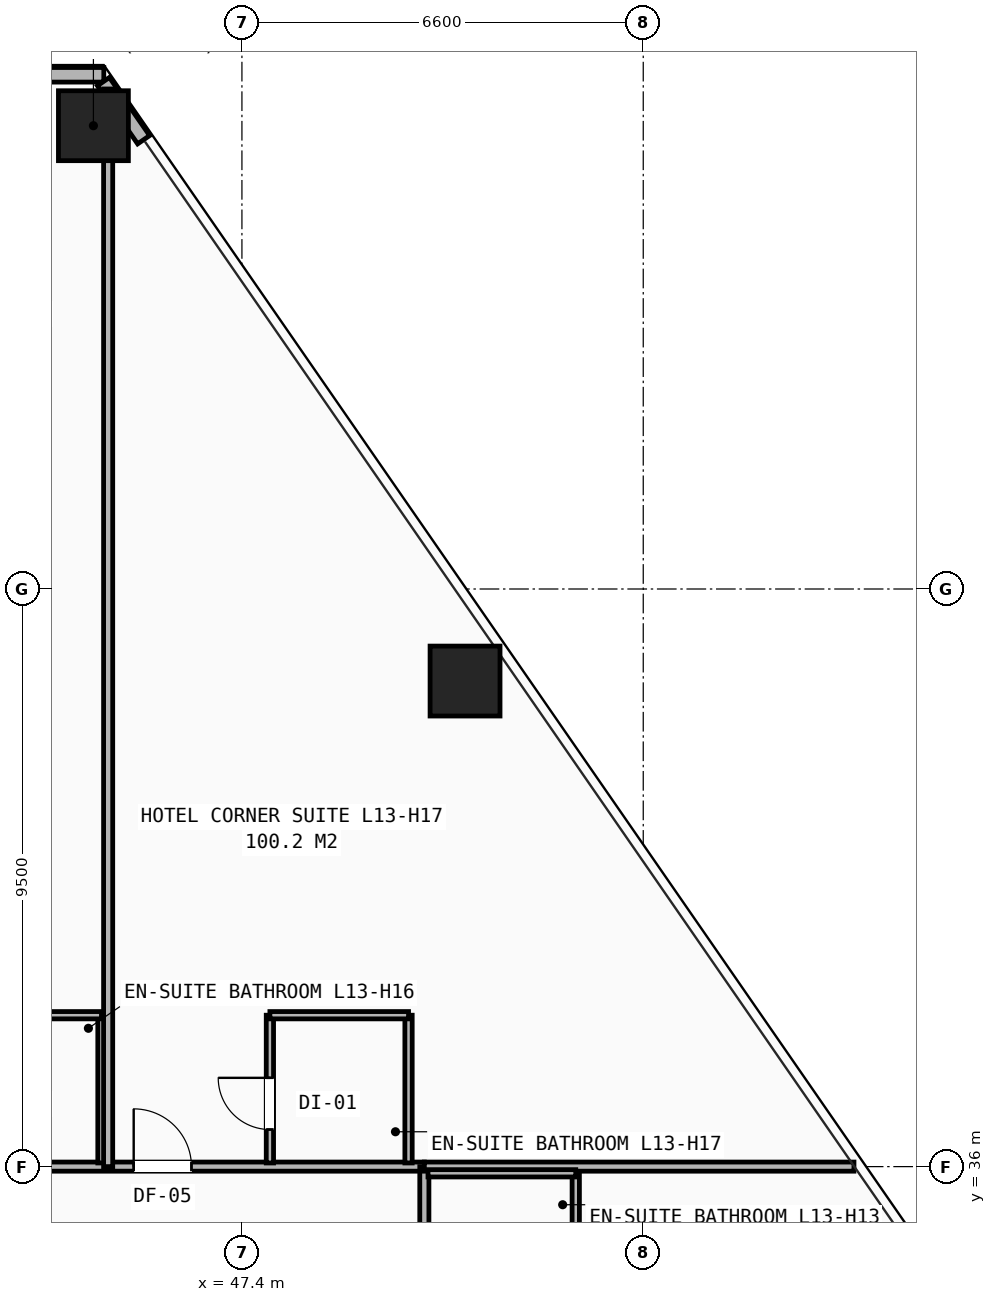
"""IFC4 building model, lengths in metres.
Left out: names, types, materials, properties, quantities, classifications, styles, units other than length and angle.
Written with IfcOpenShell. Run it as: python <this file> out.ifc"""

import sys

from ifc_helpers import new_model, si_unit, direction, frame, frame_2d, origin, origin_2d, place, context, subcontext, project, spatial, rectangle, hollow_rectangle, extrude, element, fill, save


model = new_model("IFC4")
c1 = context("Model", 3, precision=1e-05, world=origin(), true_north=direction((0.0, 1.0)))
c2 = subcontext(c1, "Body", "Model", "MODEL_VIEW")
j1 = project(units=[si_unit("LENGTHUNIT", "METRE"), si_unit("PLANEANGLEUNIT", "RADIAN")], contexts=[c1])
p1 = place(None, origin())
s1 = spatial("IfcSite", under=j1, at=p1, CompositionType="ELEMENT")
p2 = place(p1, origin())
s2 = spatial("IfcBuilding", under=s1, at=p2, CompositionType="ELEMENT")
p3 = place(p2, frame((0.0, 0.0, 49.6)))
s3 = spatial("IfcBuildingStorey", under=s2, at=p3, CompositionType="ELEMENT", Elevation=49.6)
for number, where, z_axis, x_axis in (
    (1, (44.958, 53.12, 0.0), (0.0, 0.0, 1.0), (1.0, 0.0, 0.0)),
    (2, (51.069, 43.986, 0.0), (0.0, 0.0, 1.0), (1.0, 0.0, 0.0)),
):
    element("IfcColumn", number, at=place(p3, frame(where, z_axis=z_axis, x_axis=x_axis)), inside=s3, PredefinedType="COLUMN", context=c2, shape_type="SweptSolid", body=[
        extrude(hollow_rectangle(XDim=1.15, YDim=1.15, WallThickness=0.075, at=origin_2d()), origin(), (0.0, 0.0, 1.0), 3.2),
    ])
p4 = place(p3, frame((34.872, 53.957, 0.0), z_axis=(0.0, 0.0, 1.0), x_axis=(1.0, 0.0, 0.0)))
e3 = element("IfcWall", 3, at=p4, inside=s3, PredefinedType="SHEAR", context=c2, shape_type="SweptSolid", body=[
    extrude(rectangle(XDim=10.257, YDim=0.24, at=frame_2d((5.128, 0.0))), origin(), (0.0, 0.0, 1.0), 2.263),
])
p5 = place(p3, frame((45.784, 52.889, 0.0), z_axis=(0.0, 0.0, 1.0), x_axis=(-0.569057100516, 0.822298009454, 0.0)))
e4 = element("IfcWall", 4, at=p5, inside=s3, PredefinedType="SHEAR", context=c2, shape_type="SweptSolid", body=[
    extrude(rectangle(XDim=1.163, YDim=0.24, at=frame_2d((0.581, 0.0))), origin(), (0.0, 0.0, 1.0), 2.263),
])
p6 = place(p3, frame((41.275, 36.0, 0.0), z_axis=(0.0, 0.0, 1.0), x_axis=(1.0, 0.0, 0.0)))
e5 = element("IfcWall", 5, at=p6, inside=s3, PredefinedType="PARTITIONING", context=c2, shape_type="SweptSolid", body=[
    extrude(rectangle(XDim=9.125, YDim=0.15, at=frame_2d((4.562, 0.0))), origin(), (0.0, 0.0, 1.0), 2.513),
])
p7 = place(p6, frame((0.2, 0.0, 0.0)))
e6 = element("IfcOpeningElement", 6, at=p7, cuts=e5, PredefinedType="OPENING", context=c2, shape_type="SweptSolid", body=[
    extrude(rectangle(XDim=0.95, YDim=2.1, at=frame_2d((0.475, 1.05))), frame((0.0, 0.085, 0.0), z_axis=(0.0, -1.0, 0.0), x_axis=(1.0, 0.0, 0.0)), (0.0, 0.0, 1.0), 0.17),
])
p8 = place(p6, frame((4.345, 0.0, 0.0)))
e7 = element("IfcOpeningElement", 7, at=p8, cuts=e5, PredefinedType="OPENING", context=c2, shape_type="SweptSolid", body=[
    extrude(rectangle(XDim=0.95, YDim=2.1, at=frame_2d((0.475, 1.05))), frame((0.0, 0.085, 0.0), z_axis=(0.0, -1.0, 0.0), x_axis=(1.0, 0.0, 0.0)), (0.0, 0.0, 1.0), 0.17),
])
p9 = place(p3, frame((50.4, 14.1, 0.0), z_axis=(0.0, 0.0, 1.0), x_axis=(0.0, 1.0, 0.0)))
e8 = element("IfcWall", 8, at=p9, inside=s3, PredefinedType="PARTITIONING", context=c2, shape_type="SweptSolid", body=[
    extrude(rectangle(XDim=21.9, YDim=0.15, at=frame_2d((10.95, 0.0))), origin(), (0.0, 0.0, 1.0), 2.431),
])
p10 = place(p9, frame((0.42, 0.0, 0.0)))
e9 = element("IfcOpeningElement", 9, at=p10, cuts=e8, PredefinedType="OPENING", context=c2, shape_type="SweptSolid", body=[
    extrude(rectangle(XDim=0.95, YDim=2.1, at=frame_2d((0.475, 1.05))), frame((0.0, 0.085, 0.0), z_axis=(0.0, -1.0, 0.0), x_axis=(1.0, 0.0, 0.0)), (0.0, 0.0, 1.0), 0.17),
])
p11 = place(p9, frame((5.72, 0.0, 0.0)))
e10 = element("IfcOpeningElement", 10, at=p11, cuts=e8, PredefinedType="OPENING", context=c2, shape_type="SweptSolid", body=[
    extrude(rectangle(XDim=0.95, YDim=2.1, at=frame_2d((0.475, 1.05))), frame((0.0, 0.085, 0.0), z_axis=(0.0, -1.0, 0.0), x_axis=(1.0, 0.0, 0.0)), (0.0, 0.0, 1.0), 0.17),
])
p12 = place(p9, frame((11.12, 0.0, 0.0)))
e11 = element("IfcOpeningElement", 11, at=p12, cuts=e8, PredefinedType="OPENING", context=c2, shape_type="SweptSolid", body=[
    extrude(rectangle(XDim=0.95, YDim=2.1, at=frame_2d((0.475, 1.05))), frame((0.0, 0.085, 0.0), z_axis=(0.0, -1.0, 0.0), x_axis=(1.0, 0.0, 0.0)), (0.0, 0.0, 1.0), 0.17),
])
p13 = place(p9, frame((16.72, 0.0, 0.0)))
e12 = element("IfcOpeningElement", 12, at=p13, cuts=e8, PredefinedType="OPENING", context=c2, shape_type="SweptSolid", body=[
    extrude(rectangle(XDim=0.95, YDim=2.1, at=frame_2d((0.475, 1.05))), frame((0.0, 0.085, 0.0), z_axis=(0.0, -1.0, 0.0), x_axis=(1.0, 0.0, 0.0)), (0.0, 0.0, 1.0), 0.17),
])
p14 = place(p3, frame((50.4, 36.0, 0.0), z_axis=(0.0, 0.0, 1.0), x_axis=(1.0, 0.0, 0.0)))
e13 = element("IfcWall", 13, at=p14, inside=s3, PredefinedType="PARTITIONING", context=c2, shape_type="SweptSolid", body=[
    extrude(rectangle(XDim=7.065, YDim=0.15, at=frame_2d((3.533, 0.0))), origin(), (0.0, 0.0, 1.0), 2.268),
])
p15 = place(p3, frame((52.89, 33.61, 0.0), z_axis=(0.0, 0.0, 1.0), x_axis=(0.0, 1.0, 0.0)))
e14 = element("IfcWall", 14, at=p15, inside=s3, PredefinedType="PARTITIONING", context=c2, shape_type="SweptSolid", body=[
    extrude(rectangle(XDim=2.28, YDim=0.12, at=frame_2d((1.14, 0.0))), origin(), (0.0, 0.0, 1.0), 2.98),
])
p16 = place(p3, frame((50.46, 35.89, 0.0), z_axis=(0.0, 0.0, 1.0), x_axis=(1.0, 0.0, 0.0)))
e15 = element("IfcWall", 15, at=p16, inside=s3, PredefinedType="PARTITIONING", context=c2, shape_type="SweptSolid", body=[
    extrude(rectangle(XDim=2.43, YDim=0.12, at=frame_2d((1.215, 0.0))), origin(), (0.0, 0.0, 1.0), 2.513),
])
p17 = place(p3, frame((45.09, 36.06, 0.0), z_axis=(0.0, 0.0, 1.0), x_axis=(0.0, 1.0, 0.0)))
e16 = element("IfcWall", 16, at=p17, inside=s3, PredefinedType="PARTITIONING", context=c2, shape_type="SweptSolid", body=[
    extrude(rectangle(XDim=2.43, YDim=0.12, at=frame_2d((1.215, 0.0))), origin(), (0.0, 0.0, 1.0), 2.98),
])
p18 = place(p3, frame((42.81, 38.49, 0.0), z_axis=(0.0, 0.0, 1.0), x_axis=(1.0, 0.0, 0.0)))
e17 = element("IfcWall", 17, at=p18, inside=s3, PredefinedType="PARTITIONING", context=c2, shape_type="SweptSolid", body=[
    extrude(rectangle(XDim=2.28, YDim=0.12, at=frame_2d((1.14, 0.0))), origin(), (0.0, 0.0, 1.0), 2.98),
])
p19 = place(p3, frame((45.2, 36.0, 0.0), z_axis=(0.0, 0.0, 1.0), x_axis=(0.0, 1.0, 0.0)))
e18 = element("IfcWall", 18, at=p19, inside=s3, PredefinedType="PARTITIONING", context=c2, shape_type="SweptSolid", body=[
    extrude(rectangle(XDim=17.724, YDim=0.15, at=frame_2d((8.862, 0.0))), origin(), (0.0, 0.0, 1.0), 2.268),
])
p20 = place(p3, frame((47.86, 36.06, 0.0), z_axis=(0.0, 0.0, 1.0), x_axis=(0.0, 1.0, 0.0)))
e19 = element("IfcWall", 19, at=p20, inside=s3, PredefinedType="PARTITIONING", context=c2, shape_type="SweptSolid", body=[
    extrude(rectangle(XDim=2.43, YDim=0.12, at=frame_2d((1.215, 0.0))), origin(), (0.0, 0.0, 1.0), 2.98),
])
p21 = place(p20, frame((0.55, 0.0, 0.0)))
e20 = element("IfcOpeningElement", 20, at=p21, cuts=e19, PredefinedType="OPENING", context=c2, shape_type="SweptSolid", body=[
    extrude(rectangle(XDim=0.85, YDim=2.05, at=frame_2d((0.425, 1.025))), frame((0.0, 0.07, 0.0), z_axis=(0.0, -1.0, 0.0), x_axis=(1.0, 0.0, 0.0)), (0.0, 0.0, 1.0), 0.14),
])
p22 = place(p3, frame((50.14, 36.06, 0.0), z_axis=(0.0, 0.0, 1.0), x_axis=(0.0, 1.0, 0.0)))
e21 = element("IfcWall", 21, at=p22, inside=s3, PredefinedType="PARTITIONING", context=c2, shape_type="SweptSolid", body=[
    extrude(rectangle(XDim=2.43, YDim=0.12, at=frame_2d((1.215, 0.0))), origin(), (0.0, 0.0, 1.0), 2.513),
])
p23 = place(p3, frame((47.86, 38.49, 0.0), z_axis=(0.0, 0.0, 1.0), x_axis=(1.0, 0.0, 0.0)))
e22 = element("IfcWall", 22, at=p23, inside=s3, PredefinedType="PARTITIONING", context=c2, shape_type="SweptSolid", body=[
    extrude(rectangle(XDim=2.28, YDim=0.12, at=frame_2d((1.14, 0.0))), origin(), (0.0, 0.0, 1.0), 2.513),
])
p24 = place(p8, origin())
e23 = element("IfcDoor", 23, at=p24, inside=s3, OperationType="SINGLE_SWING_LEFT", PredefinedType="DOOR", context=c2, shape_type="SweptSolid", body=[
    extrude(rectangle(XDim=0.95, YDim=2.1, at=frame_2d((0.475, 1.05))), frame((0.0, 0.025, 0.0), z_axis=(0.0, -1.0, 0.0), x_axis=(1.0, 0.0, 0.0)), (0.0, 0.0, 1.0), 0.05),
])
fill(e7, e23)
p25 = place(p21, origin())
e24 = element("IfcDoor", 24, at=p25, inside=s3, OperationType="SINGLE_SWING_RIGHT", PredefinedType="DOOR", context=c2, shape_type="SweptSolid", body=[
    extrude(rectangle(XDim=0.85, YDim=2.05, at=frame_2d((0.425, 1.025))), frame((0.0, 0.025, 0.0), z_axis=(0.0, -1.0, 0.0), x_axis=(1.0, 0.0, 0.0)), (0.0, 0.0, 1.0), 0.05),
])
fill(e20, e24)
save(model, sys.argv[1])
